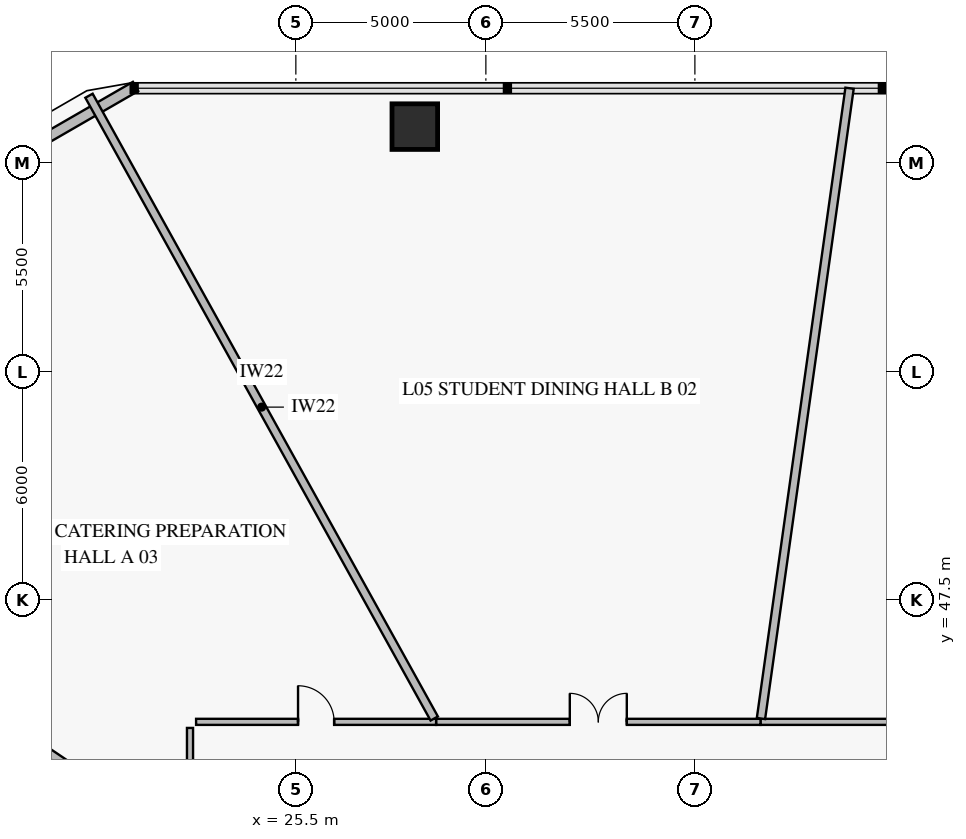
"""IFC4 building model, lengths in metres.
Left out: names, types, materials, properties, quantities, classifications, styles, units other than length and angle.
Written with IfcOpenShell. Run it as: python <this file> out.ifc"""

import sys

from ifc_helpers import new_model, si_unit, direction, frame, frame_2d, origin, origin_2d, place, context, subcontext, project, spatial, rectangle, extrude, element, fill, save


model = new_model("IFC4")
c1 = context("Model", 3, precision=1e-05, world=origin(), true_north=direction((0.0, 1.0)))
c2 = subcontext(c1, "Body", "Model", "MODEL_VIEW")
j1 = project(units=[si_unit("LENGTHUNIT", "METRE"), si_unit("PLANEANGLEUNIT", "RADIAN")], contexts=[c1])
p1 = place(None, origin())
s1 = spatial("IfcSite", under=j1, at=p1, CompositionType="ELEMENT")
p2 = place(p1, origin())
s2 = spatial("IfcBuilding", under=s1, at=p2, CompositionType="ELEMENT")
p3 = place(p2, frame((0.0, 0.0, 20.4)))
s3 = spatial("IfcBuildingStorey", under=s2, at=p3, CompositionType="ELEMENT", Elevation=20.4)
p4 = place(p3, frame((28.63, 59.948, 0.0), z_axis=(0.0, 0.0, 1.0), x_axis=(-1.0, 0.0, 0.0)))
e1 = element("IfcColumn", 1, at=p4, inside=s3, PredefinedType="COLUMN", context=c2, shape_type="SweptSolid", body=[
    extrude(rectangle(XDim=1.2, YDim=1.2, at=origin_2d()), origin(), (0.0, 0.0, 1.0), 3.92),
])
p5 = place(p3, frame((18.239, 59.249, 0.0), z_axis=(0.0, 0.0, 1.0), x_axis=(0.866007452331, 0.500031091541, 0.0)))
e2 = element("IfcWall", 2, at=p5, inside=s3, PredefinedType="SOLIDWALL", context=c2, shape_type="SweptSolid", body=[
    extrude(rectangle(XDim=3.515, YDim=0.28, at=frame_2d((1.757, 0.0))), origin(), (0.0, 0.0, 1.0), 3.92),
])
p6 = place(p3, frame((48.285, 44.285, 0.0), z_axis=(0.0, 0.0, 1.0), x_axis=(-1.0, 0.0, 0.0)))
e3 = element("IfcWall", 3, at=p6, inside=s3, PredefinedType="PARTITIONING", context=c2, shape_type="SweptSolid", body=[
    extrude(rectangle(XDim=10.558, YDim=0.16, at=frame_2d((5.279, 0.0))), origin(), (0.0, 0.0, 1.0), 3.22),
])
p7 = place(p6, frame((4.529, 0.0, 0.0)))
e4 = element("IfcOpeningElement", 4, at=p7, cuts=e3, PredefinedType="OPENING", context=c2, shape_type="SweptSolid", body=[
    extrude(rectangle(XDim=1.5, YDim=2.15, at=frame_2d((0.75, 1.075))), frame((0.0, 0.092, 0.0), z_axis=(0.0, -1.0, 0.0), x_axis=(1.0, 0.0, 0.0)), (0.0, 0.0, 1.0), 0.184),
])
p8 = place(p3, frame((37.727, 44.285, 0.0), z_axis=(0.0, 0.0, 1.0), x_axis=(-1.0, 0.0, 0.0)))
e5 = element("IfcWall", 5, at=p8, inside=s3, PredefinedType="PARTITIONING", context=c2, shape_type="SweptSolid", body=[
    extrude(rectangle(XDim=8.536, YDim=0.16, at=frame_2d((4.268, 0.0))), origin(), (0.0, 0.0, 1.0), 3.22),
])
p9 = place(p8, frame((3.518, 0.0, 0.0)))
e6 = element("IfcOpeningElement", 6, at=p9, cuts=e5, PredefinedType="OPENING", context=c2, shape_type="SweptSolid", body=[
    extrude(rectangle(XDim=1.5, YDim=2.15, at=frame_2d((0.75, 1.075))), frame((0.0, 0.092, 0.0), z_axis=(0.0, -1.0, 0.0), x_axis=(1.0, 0.0, 0.0)), (0.0, 0.0, 1.0), 0.184),
])
p10 = place(p3, frame((29.19, 44.285, 0.0), z_axis=(0.0, 0.0, 1.0), x_axis=(-1.0, 0.0, 0.0)))
e7 = element("IfcWall", 7, at=p10, inside=s3, PredefinedType="PARTITIONING", context=c2, shape_type="SweptSolid", body=[
    extrude(rectangle(XDim=6.315, YDim=0.16, at=frame_2d((3.158, 0.0))), origin(), (0.0, 0.0, 1.0), 3.22),
])
p11 = place(p10, frame((2.683, 0.0, 0.0)))
e8 = element("IfcOpeningElement", 8, at=p11, cuts=e7, PredefinedType="OPENING", context=c2, shape_type="SweptSolid", body=[
    extrude(rectangle(XDim=0.95, YDim=2.1, at=frame_2d((0.475, 1.05))), frame((0.0, 0.092, 0.0), z_axis=(0.0, -1.0, 0.0), x_axis=(1.0, 0.0, 0.0)), (0.0, 0.0, 1.0), 0.184),
])
p12 = place(p3, frame((37.739, 44.373, 0.0), z_axis=(0.0, 0.0, 1.0), x_axis=(0.139165938444, 0.990269075341, 0.0)))
e9 = element("IfcWall", 9, at=p12, inside=s3, PredefinedType="PARTITIONING", context=c2, shape_type="SweptSolid", body=[
    extrude(rectangle(XDim=16.749, YDim=0.22, at=frame_2d((8.374, 0.0))), origin(), (0.0, 0.0, 1.0), 3.17),
])
p13 = place(p3, frame((29.142, 44.373, 0.0), z_axis=(0.0, 0.0, 1.0), x_axis=(-0.484814111505, 0.874617217579, 0.0)))
e10 = element("IfcWall", 10, at=p13, inside=s3, PredefinedType="PARTITIONING", context=c2, shape_type="SweptSolid", body=[
    extrude(rectangle(XDim=18.738, YDim=0.22, at=frame_2d((9.369, 0.0))), origin(), (0.0, 0.0, 1.0), 3.17),
])
p14 = place(p3, frame((22.715, 40.961, 0.0), z_axis=(0.0, 0.0, 1.0), x_axis=(-0.829037316792, 0.559193282654, 0.0)))
e11 = element("IfcWall", 11, at=p14, inside=s3, PredefinedType="PARTITIONING", context=c2, shape_type="SweptSolid", body=[
    extrude(rectangle(XDim=13.005, YDim=0.22, at=frame_2d((6.502, 0.0))), origin(), (0.0, 0.0, 1.0), 3.17),
])
p15 = place(p3, frame((22.715, 44.125, 0.0), z_axis=(0.0, 0.0, 1.0), x_axis=(0.0, -1.0, 0.0)))
e12 = element("IfcWall", 12, at=p15, inside=s3, PredefinedType="PARTITIONING", context=c2, shape_type="SweptSolid", body=[
    extrude(rectangle(XDim=3.022, YDim=0.16, at=frame_2d((1.511, 0.0))), origin(), (0.0, 0.0, 1.0), 3.92),
])
p16 = place(p9, frame((1.5, 0.0, 0.0), z_axis=(0.0, 0.0, 1.0), x_axis=(-1.0, 0.0, 0.0)))
e13 = element("IfcDoor", 13, at=p16, inside=s3, OperationType="DOUBLE_DOOR_SINGLE_SWING", PredefinedType="DOOR", context=c2, shape_type="SweptSolid", body=[
    extrude(rectangle(XDim=1.5, YDim=2.15, at=frame_2d((0.75, 1.075))), frame((0.0, 0.025, 0.0), z_axis=(0.0, -1.0, 0.0), x_axis=(1.0, 0.0, 0.0)), (0.0, 0.0, 1.0), 0.05),
])
fill(e6, e13)
p17 = place(p11, frame((0.95, 0.0, 0.0), z_axis=(0.0, 0.0, 1.0), x_axis=(-1.0, 0.0, 0.0)))
e14 = element("IfcDoor", 14, at=p17, inside=s3, OperationType="SINGLE_SWING_LEFT", PredefinedType="DOOR", context=c2, shape_type="SweptSolid", body=[
    extrude(rectangle(XDim=0.95, YDim=2.1, at=frame_2d((0.475, 1.05))), frame((0.0, 0.025, 0.0), z_axis=(0.0, -1.0, 0.0), x_axis=(1.0, 0.0, 0.0)), (0.0, 0.0, 1.0), 0.05),
])
fill(e8, e14)
save(model, sys.argv[1])
